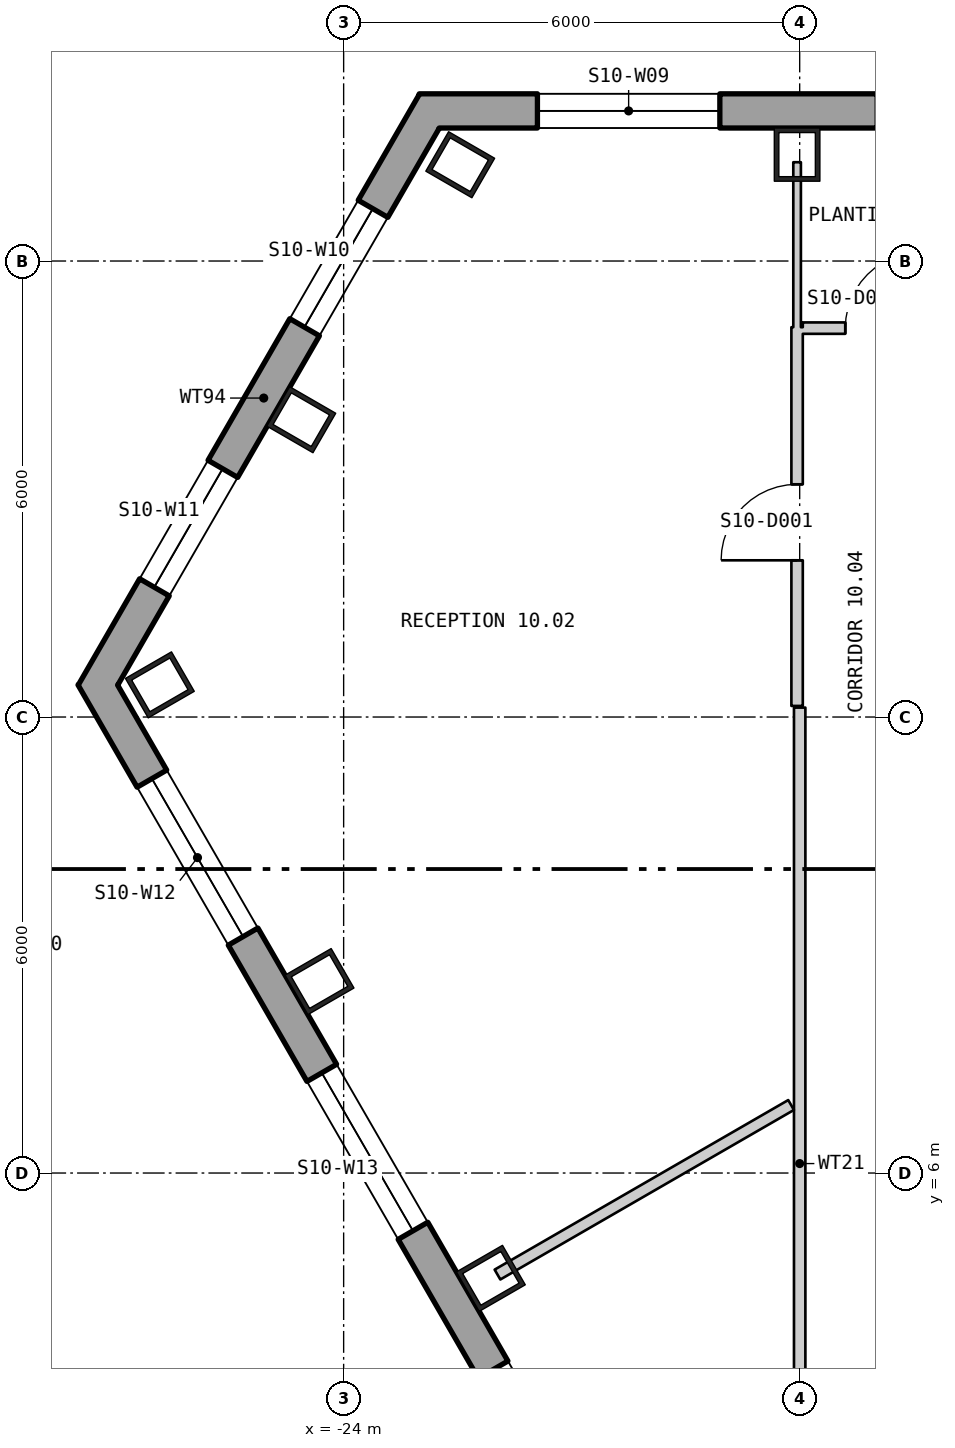
"""IFC4 building model, lengths in metres.
Left out: names, types, materials, properties, quantities, classifications, styles, units other than length and angle.
Written with IfcOpenShell. Run it as: python <this file> out.ifc"""

import sys

from ifc_helpers import new_model, si_unit, direction, frame, frame_2d, origin, origin_2d, place, context, subcontext, project, spatial, polyline, rectangle, hollow_rectangle, outline, extrude, element, fill, save


model = new_model("IFC4")
c1 = context("Model", 3, precision=1e-05, world=origin(), true_north=direction((0.0, 1.0)))
c2 = subcontext(c1, "Body", "Model", "MODEL_VIEW")
j1 = project(units=[si_unit("LENGTHUNIT", "METRE"), si_unit("PLANEANGLEUNIT", "RADIAN")], contexts=[c1])
p1 = place(None, origin())
s1 = spatial("IfcSite", under=j1, at=p1, CompositionType="ELEMENT")
p2 = place(p1, origin())
s2 = spatial("IfcBuilding", under=s1, at=p2, CompositionType="ELEMENT")
p3 = place(p2, frame((0.0, 0.0, 139.8)))
s3 = spatial("IfcBuildingStorey", under=s2, at=p3, CompositionType="ELEMENT", Elevation=139.8)
for number, where, z_axis, x_axis in (
    (1, (-18.034, 19.4, 0.0), (0.0, 0.0, 1.0), (-1.0, 0.0, 0.0)),
    (2, (-22.466, 19.267, 0.0), (0.0, 0.0, 1.0), (-0.5, -0.866, 0.0)),
    (3, (-24.557, 15.912, 0.0), (0.0, 0.0, 1.0), (-0.5, -0.866, 0.0)),
    (4, (-26.418, 12.423, 0.0), (0.0, 0.0, 1.0), (0.5, -0.866, 0.0)),
    (5, (-24.317, 8.519, 0.0), (0.0, 0.0, 1.0), (0.5, -0.866, 0.0)),
    (6, (-22.063, 4.614, 0.0), (0.0, 0.0, 1.0), (0.5, -0.866, 0.0)),
):
    element("IfcColumn", number, at=place(p3, frame(where, z_axis=z_axis, x_axis=x_axis)), inside=s3, PredefinedType="COLUMN", context=c2, shape_type="SweptSolid", body=[
        extrude(hollow_rectangle(XDim=0.6, YDim=0.7, WallThickness=0.06, at=origin_2d()), origin(), (0.0, 0.0, 1.0), 3.9),
    ])
p4 = place(p3, frame((22.875, 19.975, -0.4), z_axis=(0.0, 0.0, 1.0), x_axis=(-1.0, 0.0, 0.0)))
e7 = element("IfcWall", 7, at=p4, inside=s3, PredefinedType="SOLIDWALL", context=c2, shape_type="SweptSolid", body=[
    extrude(outline(polyline([(-0.13, -0.225), (45.88, -0.225), (45.62, 0.225), (0.13, 0.225), (-0.13, -0.225)])), origin(), (0.0, 0.0, 1.0), 3.9),
])
p5 = place(p4, frame((1.425, 0.0, 1.3)))
e8 = element("IfcOpeningElement", 8, at=p5, cuts=e7, PredefinedType="OPENING", context=c2, shape_type="SweptSolid", body=[
    extrude(rectangle(XDim=2.4, YDim=2.0, at=frame_2d((1.2, 1.0))), frame((0.0, 0.235, 0.0), z_axis=(0.0, -1.0, 0.0), x_axis=(1.0, 0.0, 0.0)), (0.0, 0.0, 1.0), 0.47),
])
p6 = place(p4, frame((10.403, 0.0, 1.3)))
e9 = element("IfcOpeningElement", 9, at=p6, cuts=e7, PredefinedType="OPENING", context=c2, shape_type="SweptSolid", body=[
    extrude(rectangle(XDim=2.4, YDim=2.0, at=frame_2d((1.2, 1.0))), frame((0.0, 0.235, 0.0), z_axis=(0.0, -1.0, 0.0), x_axis=(1.0, 0.0, 0.0)), (0.0, 0.0, 1.0), 0.47),
])
p7 = place(p4, frame((14.912, 0.0, 1.3)))
e10 = element("IfcOpeningElement", 10, at=p7, cuts=e7, PredefinedType="OPENING", context=c2, shape_type="SweptSolid", body=[
    extrude(rectangle(XDim=2.4, YDim=2.0, at=frame_2d((1.2, 1.0))), frame((0.0, 0.235, 0.0), z_axis=(0.0, -1.0, 0.0), x_axis=(1.0, 0.0, 0.0)), (0.0, 0.0, 1.0), 0.47),
])
p8 = place(p4, frame((19.421, 0.0, 1.3)))
e11 = element("IfcOpeningElement", 11, at=p8, cuts=e7, PredefinedType="OPENING", context=c2, shape_type="SweptSolid", body=[
    extrude(rectangle(XDim=2.4, YDim=2.0, at=frame_2d((1.2, 1.0))), frame((0.0, 0.235, 0.0), z_axis=(0.0, -1.0, 0.0), x_axis=(1.0, 0.0, 0.0)), (0.0, 0.0, 1.0), 0.47),
])
p9 = place(p4, frame((23.929, 0.0, 1.3)))
e12 = element("IfcOpeningElement", 12, at=p9, cuts=e7, PredefinedType="OPENING", context=c2, shape_type="SweptSolid", body=[
    extrude(rectangle(XDim=2.4, YDim=2.0, at=frame_2d((1.2, 1.0))), frame((0.0, 0.235, 0.0), z_axis=(0.0, -1.0, 0.0), x_axis=(1.0, 0.0, 0.0)), (0.0, 0.0, 1.0), 0.47),
])
p10 = place(p4, frame((28.438, 0.0, 1.3)))
e13 = element("IfcOpeningElement", 13, at=p10, cuts=e7, PredefinedType="OPENING", context=c2, shape_type="SweptSolid", body=[
    extrude(rectangle(XDim=2.4, YDim=2.0, at=frame_2d((1.2, 1.0))), frame((0.0, 0.235, 0.0), z_axis=(0.0, -1.0, 0.0), x_axis=(1.0, 0.0, 0.0)), (0.0, 0.0, 1.0), 0.47),
])
p11 = place(p4, frame((32.947, 0.0, 1.3)))
e14 = element("IfcOpeningElement", 14, at=p11, cuts=e7, PredefinedType="OPENING", context=c2, shape_type="SweptSolid", body=[
    extrude(rectangle(XDim=2.4, YDim=2.0, at=frame_2d((1.2, 1.0))), frame((0.0, 0.235, 0.0), z_axis=(0.0, -1.0, 0.0), x_axis=(1.0, 0.0, 0.0)), (0.0, 0.0, 1.0), 0.47),
])
p12 = place(p4, frame((37.455, 0.0, 1.3)))
e15 = element("IfcOpeningElement", 15, at=p12, cuts=e7, PredefinedType="OPENING", context=c2, shape_type="SweptSolid", body=[
    extrude(rectangle(XDim=2.4, YDim=2.0, at=frame_2d((1.2, 1.0))), frame((0.0, 0.235, 0.0), z_axis=(0.0, -1.0, 0.0), x_axis=(1.0, 0.0, 0.0)), (0.0, 0.0, 1.0), 0.47),
])
p13 = place(p4, frame((41.925, 0.0, 1.3)))
e16 = element("IfcOpeningElement", 16, at=p13, cuts=e7, PredefinedType="OPENING", context=c2, shape_type="SweptSolid", body=[
    extrude(rectangle(XDim=2.4, YDim=2.0, at=frame_2d((1.2, 1.0))), frame((0.0, 0.235, 0.0), z_axis=(0.0, -1.0, 0.0), x_axis=(1.0, 0.0, 0.0)), (0.0, 0.0, 1.0), 0.47),
])
p14 = place(p3, frame((-22.871, 19.973, -0.4), z_axis=(0.0, 0.0, 1.0), x_axis=(-0.500000731243, -0.866024981601, 0.0)))
e17 = element("IfcWall", 17, at=p14, inside=s3, PredefinedType="SOLIDWALL", context=c2, shape_type="SweptSolid", body=[
    extrude(outline(polyline([(-0.13, -0.225), (8.85, -0.225), (8.59, 0.225), (0.13, 0.225), (-0.13, -0.225)])), origin(), (0.0, 0.0, 1.0), 3.9),
])
p15 = place(p14, frame((1.484, 0.0, 1.3)))
e18 = element("IfcOpeningElement", 18, at=p15, cuts=e17, PredefinedType="OPENING", context=c2, shape_type="SweptSolid", body=[
    extrude(rectangle(XDim=1.8, YDim=2.0, at=frame_2d((0.9, 1.0))), frame((0.0, 0.235, 0.0), z_axis=(0.0, -1.0, 0.0), x_axis=(1.0, 0.0, 0.0)), (0.0, 0.0, 1.0), 0.47),
])
p16 = place(p14, frame((5.436, 0.0, 1.3)))
e19 = element("IfcOpeningElement", 19, at=p16, cuts=e17, PredefinedType="OPENING", context=c2, shape_type="SweptSolid", body=[
    extrude(rectangle(XDim=1.8, YDim=2.0, at=frame_2d((0.9, 1.0))), frame((0.0, 0.235, 0.0), z_axis=(0.0, -1.0, 0.0), x_axis=(1.0, 0.0, 0.0)), (0.0, 0.0, 1.0), 0.47),
])
p17 = place(p3, frame((-27.235, 12.423, -0.18), z_axis=(0.0, 0.0, 1.0), x_axis=(0.500000335318, -0.866025210188, 0.0)))
e20 = element("IfcWall", 20, at=p17, inside=s3, PredefinedType="SOLIDWALL", context=c2, shape_type="SweptSolid", body=[
    extrude(outline(polyline([(-0.13, -0.225), (45.88, -0.225), (45.62, 0.225), (0.13, 0.225), (-0.13, -0.225)])), origin(), (0.0, 0.0, 1.0), 3.68),
])
p18 = place(p17, frame((1.425, 0.0, 1.08)))
e21 = element("IfcOpeningElement", 21, at=p18, cuts=e20, PredefinedType="OPENING", context=c2, shape_type="SweptSolid", body=[
    extrude(rectangle(XDim=2.4, YDim=2.0, at=frame_2d((1.2, 1.0))), frame((0.0, 0.235, 0.0), z_axis=(0.0, -1.0, 0.0), x_axis=(1.0, 0.0, 0.0)), (0.0, 0.0, 1.0), 0.47),
])
p19 = place(p17, frame((5.895, 0.0, 1.08)))
e22 = element("IfcOpeningElement", 22, at=p19, cuts=e20, PredefinedType="OPENING", context=c2, shape_type="SweptSolid", body=[
    extrude(rectangle(XDim=2.4, YDim=2.0, at=frame_2d((1.2, 1.0))), frame((0.0, 0.235, 0.0), z_axis=(0.0, -1.0, 0.0), x_axis=(1.0, 0.0, 0.0)), (0.0, 0.0, 1.0), 0.47),
])
p20 = place(p17, frame((10.403, 0.0, 1.08)))
e23 = element("IfcOpeningElement", 23, at=p20, cuts=e20, PredefinedType="OPENING", context=c2, shape_type="SweptSolid", body=[
    extrude(rectangle(XDim=2.4, YDim=2.0, at=frame_2d((1.2, 1.0))), frame((0.0, 0.235, 0.0), z_axis=(0.0, -1.0, 0.0), x_axis=(1.0, 0.0, 0.0)), (0.0, 0.0, 1.0), 0.47),
])
p21 = place(p17, frame((14.912, 0.0, 1.08)))
e24 = element("IfcOpeningElement", 24, at=p21, cuts=e20, PredefinedType="OPENING", context=c2, shape_type="SweptSolid", body=[
    extrude(rectangle(XDim=2.4, YDim=2.0, at=frame_2d((1.2, 1.0))), frame((0.0, 0.235, 0.0), z_axis=(0.0, -1.0, 0.0), x_axis=(1.0, 0.0, 0.0)), (0.0, 0.0, 1.0), 0.47),
])
p22 = place(p17, frame((19.421, 0.0, 1.08)))
e25 = element("IfcOpeningElement", 25, at=p22, cuts=e20, PredefinedType="OPENING", context=c2, shape_type="SweptSolid", body=[
    extrude(rectangle(XDim=2.4, YDim=2.0, at=frame_2d((1.2, 1.0))), frame((0.0, 0.235, 0.0), z_axis=(0.0, -1.0, 0.0), x_axis=(1.0, 0.0, 0.0)), (0.0, 0.0, 1.0), 0.47),
])
p23 = place(p17, frame((23.929, 0.0, 1.08)))
e26 = element("IfcOpeningElement", 26, at=p23, cuts=e20, PredefinedType="OPENING", context=c2, shape_type="SweptSolid", body=[
    extrude(rectangle(XDim=2.4, YDim=2.0, at=frame_2d((1.2, 1.0))), frame((0.0, 0.235, 0.0), z_axis=(0.0, -1.0, 0.0), x_axis=(1.0, 0.0, 0.0)), (0.0, 0.0, 1.0), 0.47),
])
p24 = place(p17, frame((28.438, 0.0, 1.08)))
e27 = element("IfcOpeningElement", 27, at=p24, cuts=e20, PredefinedType="OPENING", context=c2, shape_type="SweptSolid", body=[
    extrude(rectangle(XDim=2.4, YDim=2.0, at=frame_2d((1.2, 1.0))), frame((0.0, 0.235, 0.0), z_axis=(0.0, -1.0, 0.0), x_axis=(1.0, 0.0, 0.0)), (0.0, 0.0, 1.0), 0.47),
])
p25 = place(p17, frame((32.947, 0.0, 1.08)))
e28 = element("IfcOpeningElement", 28, at=p25, cuts=e20, PredefinedType="OPENING", context=c2, shape_type="SweptSolid", body=[
    extrude(rectangle(XDim=2.4, YDim=2.0, at=frame_2d((1.2, 1.0))), frame((0.0, 0.235, 0.0), z_axis=(0.0, -1.0, 0.0), x_axis=(1.0, 0.0, 0.0)), (0.0, 0.0, 1.0), 0.47),
])
p26 = place(p17, frame((37.455, 0.0, 1.08)))
e29 = element("IfcOpeningElement", 29, at=p26, cuts=e20, PredefinedType="OPENING", context=c2, shape_type="SweptSolid", body=[
    extrude(rectangle(XDim=2.4, YDim=2.0, at=frame_2d((1.2, 1.0))), frame((0.0, 0.235, 0.0), z_axis=(0.0, -1.0, 0.0), x_axis=(1.0, 0.0, 0.0)), (0.0, 0.0, 1.0), 0.47),
])
p27 = place(p17, frame((41.925, 0.0, 1.08)))
e30 = element("IfcOpeningElement", 30, at=p27, cuts=e20, PredefinedType="OPENING", context=c2, shape_type="SweptSolid", body=[
    extrude(rectangle(XDim=2.4, YDim=2.0, at=frame_2d((1.2, 1.0))), frame((0.0, 0.235, 0.0), z_axis=(0.0, -1.0, 0.0), x_axis=(1.0, 0.0, 0.0)), (0.0, 0.0, 1.0), 0.47),
])
p28 = place(p3, frame((-21.976, 4.664, 0.0), z_axis=(0.0, 0.0, 1.0), x_axis=(0.865957845807, 0.500116995598, 0.0)))
e31 = element("IfcWall", 31, at=p28, inside=s3, PredefinedType="PARTITIONING", context=c2, shape_type="SweptSolid", body=[
    extrude(rectangle(XDim=4.461, YDim=0.15, at=frame_2d((2.231, 0.0))), origin(), (0.0, 0.0, 1.0), 3.7),
])
p29 = place(p3, frame((-18.034, 12.146, 0.0), z_axis=(0.0, 0.0, 1.0), x_axis=(0.0, 1.0, 0.0)))
e32 = element("IfcWall", 32, at=p29, inside=s3, PredefinedType="PARTITIONING", context=c2, shape_type="SweptSolid", body=[
    extrude(rectangle(XDim=4.983, YDim=0.15, at=frame_2d((2.491, 0.0))), origin(), (0.0, 0.0, 1.0), 3.7),
])
p30 = place(p29, frame((1.916, 0.0, 0.0)))
e33 = element("IfcOpeningElement", 33, at=p30, cuts=e32, PredefinedType="OPENING", context=c2, shape_type="SweptSolid", body=[
    extrude(rectangle(XDim=1.0, YDim=2.1, at=frame_2d((0.5, 1.05))), frame((0.0, 0.085, 0.0), z_axis=(0.0, -1.0, 0.0), x_axis=(1.0, 0.0, 0.0)), (0.0, 0.0, 1.0), 0.17),
])
p31 = place(p3, frame((-18.034, 17.129, 0.0), z_axis=(0.0, 0.0, 1.0), x_axis=(0.0, 1.0, 0.0)))
e34 = element("IfcWall", 34, at=p31, inside=s3, PredefinedType="PARTITIONING", context=c2, shape_type="SweptSolid", body=[
    extrude(rectangle(XDim=2.171, YDim=0.1, at=frame_2d((1.085, 0.0))), origin(), (0.0, 0.0, 1.0), 3.7),
])
p32 = place(p3, frame((-18.0, 0.125, 0.0), z_axis=(0.0, 0.0, 1.0), x_axis=(0.0, 1.0, 0.0)))
e35 = element("IfcWall", 35, at=p32, inside=s3, PredefinedType="PARTITIONING", context=c2, shape_type="SweptSolid", body=[
    extrude(rectangle(XDim=11.999, YDim=0.15, at=frame_2d((6.0, 0.0))), origin(), (0.0, 0.0, 1.0), 3.7),
])
p33 = place(p3, frame((-17.959, 17.117, 0.0), z_axis=(0.0, 0.0, 1.0), x_axis=(1.0, 0.0, 0.0)))
e36 = element("IfcWall", 36, at=p33, inside=s3, PredefinedType="PARTITIONING", context=c2, shape_type="SweptSolid", body=[
    extrude(rectangle(XDim=1.759, YDim=0.15, at=frame_2d((0.879, 0.0))), origin(), (0.0, 0.0, 1.0), 3.7),
])
p34 = place(p33, frame((0.559, 0.0, 0.0)))
e37 = element("IfcOpeningElement", 37, at=p34, cuts=e36, PredefinedType="OPENING", context=c2, shape_type="SweptSolid", body=[
    extrude(rectangle(XDim=1.0, YDim=2.1, at=frame_2d((0.5, 1.05))), frame((0.0, 0.085, 0.0), z_axis=(0.0, -1.0, 0.0), x_axis=(1.0, 0.0, 0.0)), (0.0, 0.0, 1.0), 0.17),
])
p35 = place(p13, origin())
e38 = element("IfcWindow", 38, at=p35, inside=s3, PartitioningType="SINGLE_PANEL", PredefinedType="WINDOW", context=c2, shape_type="SweptSolid", body=[
    extrude(rectangle(XDim=2.4, YDim=2.0, at=frame_2d((1.2, 1.0))), frame((0.0, 0.105, 0.0), z_axis=(0.0, -1.0, 0.0), x_axis=(1.0, 0.0, 0.0)), (0.0, 0.0, 1.0), 0.06),
])
fill(e16, e38)
p36 = place(p15, origin())
e39 = element("IfcWindow", 39, at=p36, inside=s3, PartitioningType="SINGLE_PANEL", PredefinedType="WINDOW", context=c2, shape_type="SweptSolid", body=[
    extrude(rectangle(XDim=1.8, YDim=2.0, at=frame_2d((0.9, 1.0))), frame((0.0, 0.105, 0.0), z_axis=(0.0, -1.0, 0.0), x_axis=(1.0, 0.0, 0.0)), (0.0, 0.0, 1.0), 0.06),
])
fill(e18, e39)
p37 = place(p16, origin())
e40 = element("IfcWindow", 40, at=p37, inside=s3, PartitioningType="SINGLE_PANEL", PredefinedType="WINDOW", context=c2, shape_type="SweptSolid", body=[
    extrude(rectangle(XDim=1.8, YDim=2.0, at=frame_2d((0.9, 1.0))), frame((0.0, 0.105, 0.0), z_axis=(0.0, -1.0, 0.0), x_axis=(1.0, 0.0, 0.0)), (0.0, 0.0, 1.0), 0.06),
])
fill(e19, e40)
p38 = place(p18, origin())
e41 = element("IfcWindow", 41, at=p38, inside=s3, PartitioningType="SINGLE_PANEL", PredefinedType="WINDOW", context=c2, shape_type="SweptSolid", body=[
    extrude(rectangle(XDim=2.4, YDim=2.0, at=frame_2d((1.2, 1.0))), frame((0.0, 0.105, 0.0), z_axis=(0.0, -1.0, 0.0), x_axis=(1.0, 0.0, 0.0)), (0.0, 0.0, 1.0), 0.06),
])
fill(e21, e41)
p39 = place(p19, origin())
e42 = element("IfcWindow", 42, at=p39, inside=s3, PartitioningType="SINGLE_PANEL", PredefinedType="WINDOW", context=c2, shape_type="SweptSolid", body=[
    extrude(rectangle(XDim=2.4, YDim=2.0, at=frame_2d((1.2, 1.0))), frame((0.0, 0.105, 0.0), z_axis=(0.0, -1.0, 0.0), x_axis=(1.0, 0.0, 0.0)), (0.0, 0.0, 1.0), 0.06),
])
fill(e22, e42)
p40 = place(p20, origin())
e43 = element("IfcWindow", 43, at=p40, inside=s3, PartitioningType="SINGLE_PANEL", PredefinedType="WINDOW", context=c2, shape_type="SweptSolid", body=[
    extrude(rectangle(XDim=2.4, YDim=2.0, at=frame_2d((1.2, 1.0))), frame((0.0, 0.105, 0.0), z_axis=(0.0, -1.0, 0.0), x_axis=(1.0, 0.0, 0.0)), (0.0, 0.0, 1.0), 0.06),
])
fill(e23, e43)
p41 = place(p30, origin())
e44 = element("IfcDoor", 44, at=p41, inside=s3, OperationType="SINGLE_SWING_RIGHT", PredefinedType="DOOR", context=c2, shape_type="SweptSolid", body=[
    extrude(rectangle(XDim=1.0, YDim=2.1, at=frame_2d((0.5, 1.05))), frame((0.0, 0.025, 0.0), z_axis=(0.0, -1.0, 0.0), x_axis=(1.0, 0.0, 0.0)), (0.0, 0.0, 1.0), 0.05),
])
fill(e33, e44)
p42 = place(p34, origin())
e45 = element("IfcDoor", 45, at=p42, inside=s3, OperationType="SINGLE_SWING_LEFT", PredefinedType="DOOR", context=c2, shape_type="SweptSolid", body=[
    extrude(rectangle(XDim=1.0, YDim=2.1, at=frame_2d((0.5, 1.05))), frame((0.0, 0.025, 0.0), z_axis=(0.0, -1.0, 0.0), x_axis=(1.0, 0.0, 0.0)), (0.0, 0.0, 1.0), 0.05),
])
fill(e37, e45)
save(model, sys.argv[1])
